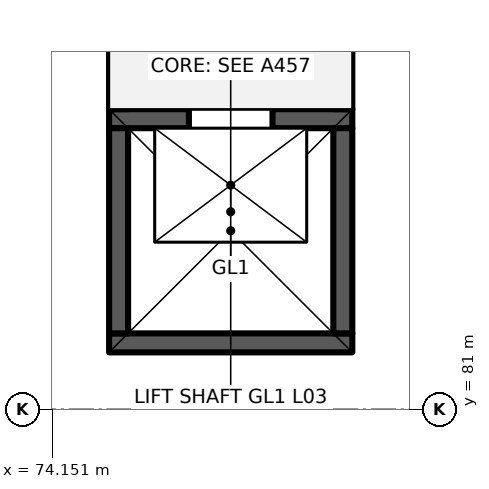
"""IFC4 building model, lengths in metres.
Left out: names, types, materials, properties, quantities, classifications, styles, units other than length and angle.
Written with IfcOpenShell. Run it as: python <this file> out.ifc"""

import sys

from ifc_helpers import new_model, si_unit, direction, frame, frame_2d, origin, place, context, subcontext, project, spatial, rectangle, extrude, element, fill, save


model = new_model("IFC4")
c1 = context("Model", 3, precision=1e-05, world=origin(), true_north=direction((0.0, 1.0)))
c2 = subcontext(c1, "Body", "Model", "MODEL_VIEW")
j1 = project(units=[si_unit("LENGTHUNIT", "METRE"), si_unit("PLANEANGLEUNIT", "RADIAN")], contexts=[c1])
p1 = place(None, origin())
s1 = spatial("IfcSite", under=j1, at=p1, CompositionType="ELEMENT")
p2 = place(p1, origin())
s2 = spatial("IfcBuilding", under=s1, at=p2, CompositionType="ELEMENT")
p3 = place(p2, frame((0.0, 0.0, 15.0)))
s3 = spatial("IfcBuildingStorey", under=s2, at=p3, CompositionType="ELEMENT", Elevation=15.0)
p4 = place(p3, frame((74.9, 84.825, 0.0), z_axis=(0.0, 0.0, 1.0), x_axis=(1.0, 0.0, 0.0)))
e1 = element("IfcWall", 1, at=p4, inside=s3, PredefinedType="SHEAR", context=c2, shape_type="SweptSolid", body=[
    extrude(rectangle(XDim=3.2, YDim=0.25, at=frame_2d((1.6, 0.0))), origin(), (0.0, 0.0, 1.0), 4.5),
])
p5 = place(p4, frame((1.05, 0.0, 0.0)))
e2 = element("IfcOpeningElement", 2, at=p5, cuts=e1, PredefinedType="OPENING", context=c2, shape_type="SweptSolid", body=[
    extrude(rectangle(XDim=1.1, YDim=2.1, at=frame_2d((0.55, 1.05))), frame((0.0, 0.135, 0.0), z_axis=(0.0, -1.0, 0.0), x_axis=(1.0, 0.0, 0.0)), (0.0, 0.0, 1.0), 0.27),
])
p6 = place(p3, frame((74.9, 81.875, 0.0), z_axis=(0.0, 0.0, 1.0), x_axis=(1.0, 0.0, 0.0)))
e3 = element("IfcWall", 3, at=p6, inside=s3, PredefinedType="SHEAR", context=c2, shape_type="SweptSolid", body=[
    extrude(rectangle(XDim=3.2, YDim=0.25, at=frame_2d((1.6, 0.0))), origin(), (0.0, 0.0, 1.0), 4.5),
])
for number, where, z_axis, x_axis in (
    (4, (75.025, 82.0, 0.0), (0.0, 0.0, 1.0), (0.0, 1.0, 0.0)),
    (5, (77.975, 82.0, 0.0), (0.0, 0.0, 1.0), (0.0, 1.0, 0.0)),
):
    element("IfcWall", number, at=place(p3, frame(where, z_axis=z_axis, x_axis=x_axis)), inside=s3, PredefinedType="SHEAR", context=c2, shape_type="SweptSolid", body=[
        extrude(rectangle(XDim=2.7, YDim=0.25, at=frame_2d((1.35, 0.0))), origin(), (0.0, 0.0, 1.0), 4.5),
    ])
for number, where, z_axis, x_axis in (
    (6, (75.025, 84.95, 0.0), (0.0, 0.0, 1.0), (0.0, 1.0, 0.0)),
    (7, (77.975, 84.95, 0.0), (0.0, 0.0, 1.0), (0.0, 1.0, 0.0)),
):
    element("IfcWall", number, at=place(p3, frame(where, z_axis=z_axis, x_axis=x_axis)), inside=s3, PredefinedType="SHEAR", context=c2, shape_type="SweptSolid", body=[
        extrude(rectangle(XDim=2.5, YDim=0.25, at=frame_2d((1.25, 0.0))), origin(), (0.0, 0.0, 1.0), 3.0),
    ])
p7 = place(p5, origin())
e8 = element("IfcDoor", 8, at=p7, inside=s3, OperationType="DOUBLE_DOOR_SLIDING", PredefinedType="DOOR", context=c2, shape_type="SweptSolid", body=[
    extrude(rectangle(XDim=1.1, YDim=2.1, at=frame_2d((0.55, 1.05))), frame((0.0, 0.025, 0.0), z_axis=(0.0, -1.0, 0.0), x_axis=(1.0, 0.0, 0.0)), (0.0, 0.0, 1.0), 0.05),
])
fill(e2, e8)
save(model, sys.argv[1])
